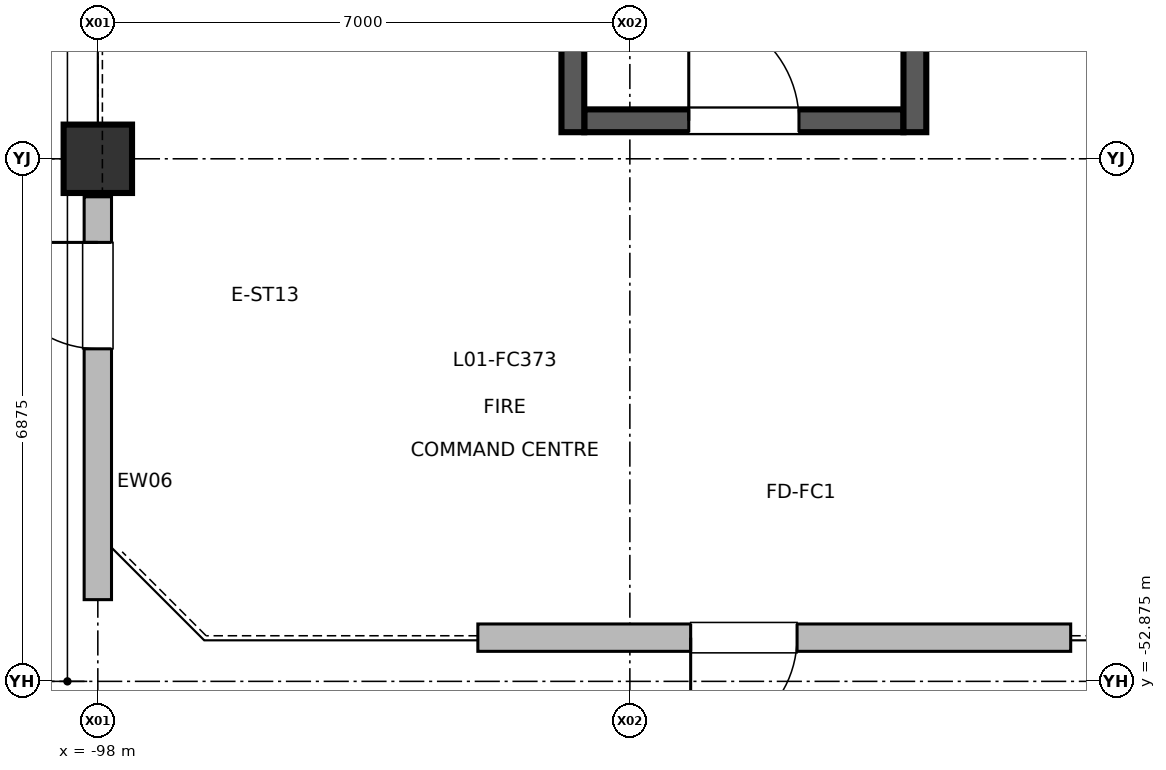
"""IFC4 building model, lengths in metres.
Left out: names, types, materials, properties, quantities, classifications, styles, units other than length and angle.
Written with IfcOpenShell. Run it as: python <this file> out.ifc"""

import sys

from ifc_helpers import new_model, si_unit, direction, frame, frame_2d, origin, origin_2d, place, context, subcontext, project, spatial, rectangle, extrude, element, fill, save


model = new_model("IFC4")
c1 = context("Model", 3, precision=1e-05, world=origin(), true_north=direction((0.0, 1.0)))
c2 = subcontext(c1, "Body", "Model", "MODEL_VIEW")
j1 = project(units=[si_unit("LENGTHUNIT", "METRE"), si_unit("PLANEANGLEUNIT", "RADIAN")], contexts=[c1])
p1 = place(None, origin())
s1 = spatial("IfcSite", under=j1, at=p1, CompositionType="ELEMENT")
p2 = place(p1, origin())
s2 = spatial("IfcBuilding", under=s1, at=p2, CompositionType="ELEMENT")
p3 = place(p2, origin())
s3 = spatial("IfcBuildingStorey", under=s2, at=p3, CompositionType="ELEMENT", Elevation=0.0)
p4 = place(p3, frame((-98.0, -46.0, 0.0), z_axis=(0.0, 0.0, 1.0), x_axis=(1.0, 0.0, 0.0)))
e1 = element("IfcColumn", 1, at=p4, inside=s3, PredefinedType="COLUMN", context=c2, shape_type="SweptSolid", body=[
    extrude(rectangle(XDim=0.9, YDim=0.9, at=origin_2d()), origin(), (0.0, 0.0, 1.0), 5.998),
])
p5 = place(p3, frame((-85.2, -52.3, 0.0), z_axis=(0.0, 0.0, 1.0), x_axis=(-1.0, 0.0, 0.0)))
e2 = element("IfcWall", 2, at=p5, inside=s3, PredefinedType="SOLIDWALL", context=c2, shape_type="SweptSolid", body=[
    extrude(rectangle(XDim=7.8, YDim=0.36, at=frame_2d((3.9, 0.0))), origin(), (0.0, 0.0, 1.0), 5.02),
])
p6 = place(p5, frame((3.6, 0.0, 0.0)))
e3 = element("IfcOpeningElement", 3, at=p6, cuts=e2, PredefinedType="OPENING", context=c2, shape_type="SweptSolid", body=[
    extrude(rectangle(XDim=1.4, YDim=2.2, at=frame_2d((0.7, 1.1))), frame((0.0, 0.19, 0.0), z_axis=(0.0, -1.0, 0.0), x_axis=(1.0, 0.0, 0.0)), (0.0, 0.0, 1.0), 0.38),
])
p7 = place(p3, frame((-98.0, -51.8, 0.0), z_axis=(0.0, 0.0, 1.0), x_axis=(0.0, 1.0, 0.0)))
e4 = element("IfcWall", 4, at=p7, inside=s3, PredefinedType="SOLIDWALL", context=c2, shape_type="SweptSolid", body=[
    extrude(rectangle(XDim=5.3, YDim=0.36, at=frame_2d((2.65, 0.0))), origin(), (0.0, 0.0, 1.0), 4.655),
])
p8 = place(p7, frame((3.3, 0.0, 0.0)))
e5 = element("IfcOpeningElement", 5, at=p8, cuts=e4, PredefinedType="OPENING", context=c2, shape_type="SweptSolid", body=[
    extrude(rectangle(XDim=1.4, YDim=2.2, at=frame_2d((0.7, 1.1))), frame((0.0, 0.19, 0.0), z_axis=(0.0, -1.0, 0.0), x_axis=(1.0, 0.0, 0.0)), (0.0, 0.0, 1.0), 0.38),
])
p9 = place(p3, frame((-91.6, -45.5, 0.0), z_axis=(0.0, 0.0, 1.0), x_axis=(1.0, 0.0, 0.0)))
e6 = element("IfcWall", 6, at=p9, inside=s3, PredefinedType="SHEAR", context=c2, shape_type="SweptSolid", body=[
    extrude(rectangle(XDim=4.2, YDim=0.3, at=frame_2d((2.1, 0.0))), origin(), (0.0, 0.0, 1.0), 5.78),
])
p10 = place(p9, frame((1.375, 0.0, 0.0)))
e7 = element("IfcOpeningElement", 7, at=p10, cuts=e6, PredefinedType="OPENING", context=c2, shape_type="SweptSolid", body=[
    extrude(rectangle(XDim=1.45, YDim=2.2, at=frame_2d((0.725, 1.1))), frame((0.0, 0.16, 0.0), z_axis=(0.0, -1.0, 0.0), x_axis=(1.0, 0.0, 0.0)), (0.0, 0.0, 1.0), 0.32),
])
for number, where, z_axis, x_axis in (
    (8, (-91.75, -45.65, 0.0), (0.0, 0.0, 1.0), (0.0, 1.0, 0.0)),
    (9, (-87.25, -45.65, 0.0), (0.0, 0.0, 1.0), (0.0, 1.0, 0.0)),
):
    element("IfcWall", number, at=place(p3, frame(where, z_axis=z_axis, x_axis=x_axis)), inside=s3, PredefinedType="SHEAR", context=c2, shape_type="SweptSolid", body=[
        extrude(rectangle(XDim=8.45, YDim=0.3, at=frame_2d((4.225, 0.0))), origin(), (0.0, 0.0, 1.0), 5.78),
    ])
p11 = place(p6, origin())
e10 = element("IfcDoor", 10, at=p11, inside=s3, OperationType="SINGLE_SWING_RIGHT", PredefinedType="DOOR", context=c2, shape_type="SweptSolid", body=[
    extrude(rectangle(XDim=1.4, YDim=2.2, at=frame_2d((0.7, 1.1))), frame((0.0, 0.025, 0.0), z_axis=(0.0, -1.0, 0.0), x_axis=(1.0, 0.0, 0.0)), (0.0, 0.0, 1.0), 0.05),
])
fill(e3, e10)
p12 = place(p8, origin())
e11 = element("IfcDoor", 11, at=p12, inside=s3, OperationType="SINGLE_SWING_RIGHT", PredefinedType="DOOR", context=c2, shape_type="SweptSolid", body=[
    extrude(rectangle(XDim=1.4, YDim=2.2, at=frame_2d((0.7, 1.1))), frame((0.0, 0.025, 0.0), z_axis=(0.0, -1.0, 0.0), x_axis=(1.0, 0.0, 0.0)), (0.0, 0.0, 1.0), 0.05),
])
fill(e5, e11)
p13 = place(p10, origin())
e12 = element("IfcDoor", 12, at=p13, inside=s3, OperationType="SINGLE_SWING_LEFT", PredefinedType="DOOR", context=c2, shape_type="SweptSolid", body=[
    extrude(rectangle(XDim=1.45, YDim=2.2, at=frame_2d((0.725, 1.1))), frame((0.0, 0.025, 0.0), z_axis=(0.0, -1.0, 0.0), x_axis=(1.0, 0.0, 0.0)), (0.0, 0.0, 1.0), 0.05),
])
fill(e7, e12)
save(model, sys.argv[1])
